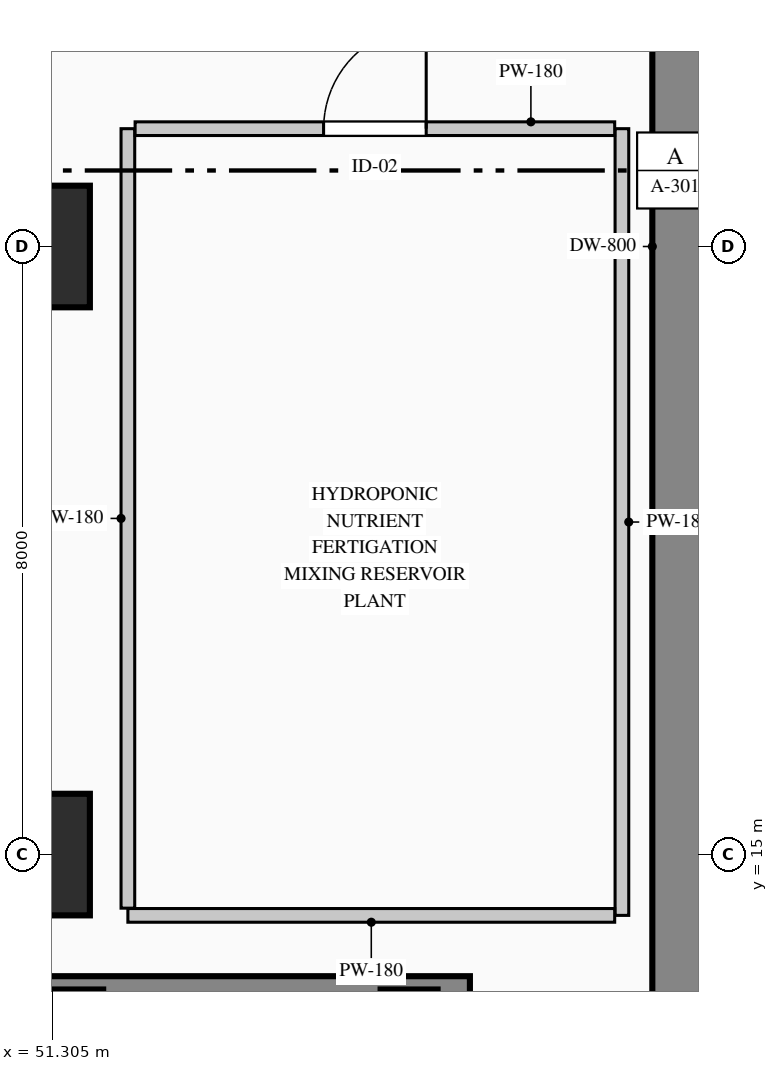
"""IFC4 building model, lengths in metres.
Left out: names, types, materials, properties, quantities, classifications, styles, units other than length and angle.
Written with IfcOpenShell. Run it as: python <this file> out.ifc"""

import sys

from ifc_helpers import new_model, si_unit, direction, frame, frame_2d, origin, origin_2d, place, context, subcontext, project, spatial, rectangle, extrude, element, fill, save


model = new_model("IFC4")
c1 = context("Model", 3, precision=1e-05, world=origin(), true_north=direction((0.0, 1.0)))
c2 = subcontext(c1, "Body", "Model", "MODEL_VIEW")
j1 = project(units=[si_unit("LENGTHUNIT", "METRE"), si_unit("PLANEANGLEUNIT", "RADIAN")], contexts=[c1])
p1 = place(None, origin())
s1 = spatial("IfcSite", under=j1, at=p1, CompositionType="ELEMENT")
p2 = place(p1, origin())
s2 = spatial("IfcBuilding", under=s1, at=p2, CompositionType="ELEMENT")
p3 = place(p2, frame((0.0, 0.0, -13.5)))
s3 = spatial("IfcBuildingStorey", under=s2, at=p3, CompositionType="ELEMENT", Elevation=-13.5)
p4 = place(p3, frame((59.6, 0.8, 0.0), z_axis=(0.0, 0.0, 1.0), x_axis=(0.0, 1.0, 0.0)))
e1 = element("IfcWall", 1, at=p4, inside=s3, PredefinedType="USERDEFINED", context=c2, shape_type="SweptSolid", body=[
    extrude(rectangle(XDim=44.4, YDim=0.8, at=frame_2d((22.2, 0.0))), origin(), (0.0, 0.0, 1.0), 4.5),
])
for number, where, z_axis, x_axis in (
    (2, (51.0, 15.0, 0.0), (0.0, 0.0, 1.0), (1.0, 0.0, 0.0)),
    (3, (51.0, 23.0, 0.0), (0.0, 0.0, 1.0), (1.0, 0.0, 0.0)),
):
    element("IfcColumn", number, at=place(p3, frame(where, z_axis=z_axis, x_axis=x_axis)), inside=s3, PredefinedType="COLUMN", context=c2, shape_type="SweptSolid", body=[
        extrude(rectangle(XDim=1.6, YDim=1.6, at=origin_2d()), origin(), (0.0, 0.0, 1.0), 4.5),
    ])
for number, where, z_axis, x_axis in (
    (4, (51.6, 12.85, 0.0), (0.0, 0.0, 1.0), (1.0, 0.0, 0.0)),
    (5, (56.0, 12.85, 0.0), (0.0, 0.0, 1.0), (1.0, 0.0, 0.0)),
):
    element("IfcColumn", number, at=place(p3, frame(where, z_axis=z_axis, x_axis=x_axis)), inside=s3, PredefinedType="COLUMN", context=c2, shape_type="SweptSolid", body=[
        extrude(rectangle(XDim=0.75, YDim=0.75, at=origin_2d()), origin(), (0.0, 0.0, 1.0), 4.2),
    ])
p5 = place(p3, frame((35.2, 13.25, 0.0), z_axis=(0.0, 0.0, 1.0), x_axis=(1.0, 0.0, 0.0)))
e6 = element("IfcWall", 6, at=p5, inside=s3, PredefinedType="SOLIDWALL", context=c2, shape_type="SweptSolid", body=[
    extrude(rectangle(XDim=21.6, YDim=0.3, at=frame_2d((10.8, 0.0))), origin(), (0.0, 0.0, 1.0), 4.5),
])
p6 = place(p3, frame((58.8, 24.55, 0.0), z_axis=(0.0, 0.0, 1.0), x_axis=(0.0, -1.0, 0.0)))
e7 = element("IfcWall", 7, at=p6, inside=s3, PredefinedType="PARTITIONING", context=c2, shape_type="SweptSolid", body=[
    extrude(rectangle(XDim=10.35, YDim=0.18, at=frame_2d((5.175, 0.0))), origin(), (0.0, 0.0, 1.0), 4.15),
])
p7 = place(p3, frame((58.705, 14.2, 0.0), z_axis=(0.0, 0.0, 1.0), x_axis=(-1.0, 0.0, 0.0)))
e8 = element("IfcWall", 8, at=p7, inside=s3, PredefinedType="PARTITIONING", context=c2, shape_type="SweptSolid", body=[
    extrude(rectangle(XDim=6.405, YDim=0.18, at=frame_2d((3.203, 0.0))), origin(), (0.0, 0.0, 1.0), 4.15),
])
p8 = place(p3, frame((52.3, 14.295, 0.0), z_axis=(0.0, 0.0, 1.0), x_axis=(0.0, 1.0, 0.0)))
e9 = element("IfcWall", 9, at=p8, inside=s3, PredefinedType="PARTITIONING", context=c2, shape_type="SweptSolid", body=[
    extrude(rectangle(XDim=10.255, YDim=0.18, at=frame_2d((5.127, 0.0))), origin(), (0.0, 0.0, 1.0), 4.15),
])
p9 = place(p3, frame((52.395, 24.55, 0.0), z_axis=(0.0, 0.0, 1.0), x_axis=(1.0, 0.0, 0.0)))
e10 = element("IfcWall", 10, at=p9, inside=s3, PredefinedType="PARTITIONING", context=c2, shape_type="SweptSolid", body=[
    extrude(rectangle(XDim=6.31, YDim=0.18, at=frame_2d((3.155, 0.0))), origin(), (0.0, 0.0, 1.0), 3.635),
])
p10 = place(p9, frame((2.48, 0.0, 0.0)))
e11 = element("IfcOpeningElement", 11, at=p10, cuts=e10, PredefinedType="OPENING", context=c2, shape_type="SweptSolid", body=[
    extrude(rectangle(XDim=1.35, YDim=2.2, at=frame_2d((0.675, 1.1))), frame((0.0, 0.1, 0.0), z_axis=(0.0, -1.0, 0.0), x_axis=(1.0, 0.0, 0.0)), (0.0, 0.0, 1.0), 0.2),
])
p11 = place(p10, origin())
e12 = element("IfcDoor", 12, at=p11, inside=s3, OperationType="SINGLE_SWING_RIGHT", PredefinedType="DOOR", context=c2, shape_type="SweptSolid", body=[
    extrude(rectangle(XDim=1.35, YDim=2.2, at=frame_2d((0.675, 1.1))), frame((0.0, 0.025, 0.0), z_axis=(0.0, -1.0, 0.0), x_axis=(1.0, 0.0, 0.0)), (0.0, 0.0, 1.0), 0.05),
])
fill(e11, e12)
save(model, sys.argv[1])
